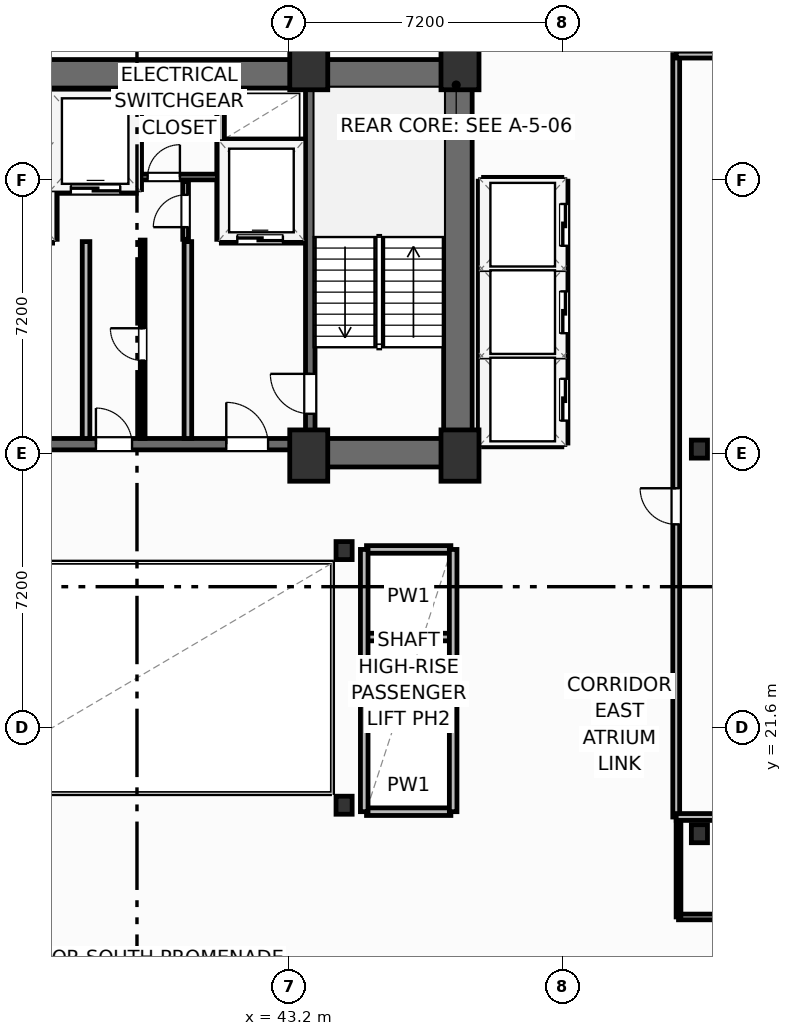
"""IFC4 building model, lengths in metres.
Left out: names, types, materials, properties, quantities, classifications, styles, units other than length and angle.
Written with IfcOpenShell. Run it as: python <this file> out.ifc"""

import sys

from ifc_helpers import new_model, si_unit, direction, frame, frame_2d, origin, origin_2d, place, context, subcontext, project, spatial, rectangle, i_section, extrude, element, fill, save


model = new_model("IFC4")
c1 = context("Model", 3, precision=1e-05, world=origin(), true_north=direction((0.0, 1.0)))
c2 = subcontext(c1, "Body", "Model", "MODEL_VIEW")
j1 = project(units=[si_unit("LENGTHUNIT", "METRE"), si_unit("PLANEANGLEUNIT", "RADIAN")], contexts=[c1])
p1 = place(None, origin())
s1 = spatial("IfcSite", under=j1, at=p1, CompositionType="ELEMENT")
p2 = place(p1, origin())
s2 = spatial("IfcBuilding", under=s1, at=p2, CompositionType="ELEMENT")
p3 = place(p2, frame((0.0, 0.0, 132.8)))
s3 = spatial("IfcBuildingStorey", under=s2, at=p3, CompositionType="ELEMENT", Elevation=132.8)
for number, where, z_axis, x_axis in (
    (1, (43.72, 28.75, 0.0), (0.0, 0.0, 1.0), (1.0, 0.0, 0.0)),
    (2, (47.7, 28.75, 0.0), (0.0, 0.0, 1.0), (1.0, 0.0, 0.0)),
    (3, (43.72, 39.05, 0.0), (0.0, 0.0, 1.0), (1.0, 0.0, 0.0)),
    (4, (47.7, 39.05, 0.0), (0.0, 0.0, 1.0), (1.0, 0.0, 0.0)),
):
    element("IfcColumn", number, at=place(p3, frame(where, z_axis=z_axis, x_axis=x_axis)), inside=s3, PredefinedType="COLUMN", context=c2, shape_type="SweptSolid", body=[
        extrude(rectangle(XDim=1.0, YDim=1.35, at=origin_2d()), origin(), (0.0, 0.0, 1.0), 3.7),
    ])
for number, where, z_axis, x_axis in (
    (5, (44.65, 19.55, 0.0), (0.0, 0.0, 1.0), (1.0, 0.0, 0.0)),
    (6, (44.65, 26.25, 0.0), (0.0, 0.0, 1.0), (1.0, 0.0, 0.0)),
    (7, (54.0, 18.8, 0.0), (0.0, 0.0, 1.0), (1.0, 0.0, 0.0)),
    (8, (54.0, 28.92, 0.0), (0.0, 0.0, 1.0), (1.0, 0.0, 0.0)),
):
    element("IfcColumn", number, at=place(p3, frame(where, z_axis=z_axis, x_axis=x_axis)), inside=s3, PredefinedType="COLUMN", context=c2, shape_type="SweptSolid", body=[
        extrude(i_section(OverallWidth=0.424, OverallDepth=0.474, WebThickness=0.048, FlangeThickness=0.077, FilletRadius=0.025, at=origin_2d()), origin(), (0.0, 0.0, 1.0), 3.7),
    ])
p4 = place(p3, frame((30.38, 38.795, 0.0), z_axis=(0.0, 0.0, 1.0), x_axis=(1.0, 0.0, 0.0)))
e9 = element("IfcWall", 9, at=p4, inside=s3, PredefinedType="SHEAR", context=c2, shape_type="SweptSolid", body=[
    extrude(rectangle(XDim=17.64, YDim=0.75, at=frame_2d((8.82, 0.0))), origin(), (0.0, 0.0, 1.0), 3.45),
])
p5 = place(p3, frame((47.645, 29.2, 0.0), z_axis=(0.0, 0.0, 1.0), x_axis=(0.0, 1.0, 0.0)))
e10 = element("IfcWall", 10, at=p5, inside=s3, PredefinedType="SHEAR", context=c2, shape_type="SweptSolid", body=[
    extrude(rectangle(XDim=9.22, YDim=0.75, at=frame_2d((4.61, 0.0))), origin(), (0.0, 0.0, 1.0), 3.45),
])
p6 = place(p3, frame((43.6, 28.825, 0.0), z_axis=(0.0, 0.0, 1.0), x_axis=(1.0, 0.0, 0.0)))
e11 = element("IfcWall", 11, at=p6, inside=s3, PredefinedType="SHEAR", context=c2, shape_type="SweptSolid", body=[
    extrude(rectangle(XDim=4.42, YDim=0.75, at=frame_2d((2.21, 0.0))), origin(), (0.0, 0.0, 1.0), 3.45),
])
p7 = place(p3, frame((34.8, 29.05, 0.0), z_axis=(0.0, 0.0, 1.0), x_axis=(1.0, 0.0, 0.0)))
e12 = element("IfcWall", 12, at=p7, inside=s3, PredefinedType="SHEAR", context=c2, shape_type="SweptSolid", body=[
    extrude(rectangle(XDim=8.8, YDim=0.3, at=frame_2d((4.4, 0.0))), origin(), (0.0, 0.0, 1.0), 3.45),
])
p8 = place(p7, frame((0.95, 0.0, 0.0)))
e13 = element("IfcOpeningElement", 13, at=p8, cuts=e12, PredefinedType="OPENING", context=c2, shape_type="SweptSolid", body=[
    extrude(rectangle(XDim=1.1, YDim=2.15, at=frame_2d((0.55, 1.075))), frame((0.0, 0.16, 0.0), z_axis=(0.0, -1.0, 0.0), x_axis=(1.0, 0.0, 0.0)), (0.0, 0.0, 1.0), 0.32),
])
p9 = place(p7, frame((6.75, 0.0, 0.0)))
e14 = element("IfcOpeningElement", 14, at=p9, cuts=e12, PredefinedType="OPENING", context=c2, shape_type="SweptSolid", body=[
    extrude(rectangle(XDim=1.1, YDim=2.15, at=frame_2d((0.55, 1.075))), frame((0.0, 0.16, 0.0), z_axis=(0.0, -1.0, 0.0), x_axis=(1.0, 0.0, 0.0)), (0.0, 0.0, 1.0), 0.32),
])
p10 = place(p7, frame((3.32, 0.0, 0.0)))
e15 = element("IfcOpeningElement", 15, at=p10, cuts=e12, PredefinedType="OPENING", context=c2, shape_type="SweptSolid", body=[
    extrude(rectangle(XDim=0.95, YDim=2.15, at=frame_2d((0.475, 1.075))), frame((0.0, 0.16, 0.0), z_axis=(0.0, -1.0, 0.0), x_axis=(1.0, 0.0, 0.0)), (0.0, 0.0, 1.0), 0.32),
])
p11 = place(p3, frame((43.76, 29.2, 0.0), z_axis=(0.0, 0.0, 1.0), x_axis=(0.0, 1.0, 0.0)))
e16 = element("IfcWall", 16, at=p11, inside=s3, PredefinedType="SHEAR", context=c2, shape_type="SweptSolid", body=[
    extrude(rectangle(XDim=9.22, YDim=0.25, at=frame_2d((4.61, 0.0))), origin(), (0.0, 0.0, 1.0), 3.45),
])
p12 = place(p11, frame((0.65, 0.0, 0.0)))
e17 = element("IfcOpeningElement", 17, at=p12, cuts=e16, PredefinedType="OPENING", context=c2, shape_type="SweptSolid", body=[
    extrude(rectangle(XDim=1.05, YDim=2.15, at=frame_2d((0.525, 1.075))), frame((0.0, 0.135, 0.0), z_axis=(0.0, -1.0, 0.0), x_axis=(1.0, 0.0, 0.0)), (0.0, 0.0, 1.0), 0.27),
])
p13 = place(p3, frame((53.45, 16.61, 0.0), z_axis=(0.0, 0.0, 1.0), x_axis=(1.0, 0.0, 0.0)))
e18 = element("IfcWall", 18, at=p13, inside=s3, PredefinedType="PARTITIONING", context=c2, shape_type="SweptSolid", body=[
    extrude(rectangle(XDim=16.55, YDim=0.15, at=frame_2d((8.275, 0.0))), origin(), (0.0, 0.0, 1.0), 3.45),
])
p14 = place(p13, frame((5.873, 0.0, 0.0)))
e19 = element("IfcOpeningElement", 19, at=p14, cuts=e18, PredefinedType="OPENING", context=c2, shape_type="SweptSolid", body=[
    extrude(rectangle(XDim=0.92, YDim=2.05, at=frame_2d((0.46, 1.025))), frame((0.0, 0.085, 0.0), z_axis=(0.0, -1.0, 0.0), x_axis=(1.0, 0.0, 0.0)), (0.0, 0.0, 1.0), 0.17),
])
p15 = place(p3, frame((53.45, 16.61, 0.0), z_axis=(0.0, 0.0, 1.0), x_axis=(0.0, 1.0, 0.0)))
e20 = element("IfcWall", 20, at=p15, inside=s3, PredefinedType="PARTITIONING", context=c2, shape_type="SweptSolid", body=[
    extrude(rectangle(XDim=2.63, YDim=0.125, at=frame_2d((1.315, 0.0))), origin(), (0.0, 0.0, 1.0), 3.45),
])
p16 = place(p3, frame((53.39, 19.24, 0.0), z_axis=(0.0, 0.0, 1.0), x_axis=(0.0, 1.0, 0.0)))
e21 = element("IfcWall", 21, at=p16, inside=s3, PredefinedType="PARTITIONING", context=c2, shape_type="SweptSolid", body=[
    extrude(rectangle(XDim=20.06, YDim=0.18, at=frame_2d((10.03, 0.0))), origin(), (0.0, 0.0, 1.0), 3.45),
])
p17 = place(p16, frame((7.7, 0.0, 0.0)))
e22 = element("IfcOpeningElement", 22, at=p17, cuts=e21, PredefinedType="OPENING", context=c2, shape_type="SweptSolid", body=[
    extrude(rectangle(XDim=0.95, YDim=2.05, at=frame_2d((0.475, 1.025))), frame((0.0, 0.1, 0.0), z_axis=(0.0, -1.0, 0.0), x_axis=(1.0, 0.0, 0.0)), (0.0, 0.0, 1.0), 0.2),
])
p18 = place(p3, frame((53.39, 19.24, 0.0), z_axis=(0.0, 0.0, 1.0), x_axis=(1.0, 0.0, 0.0)))
e23 = element("IfcWall", 23, at=p18, inside=s3, PredefinedType="PARTITIONING", context=c2, shape_type="SweptSolid", body=[
    extrude(rectangle(XDim=22.367, YDim=0.18, at=frame_2d((11.183, 0.0))), origin(), (0.0, 0.0, 1.0), 2.662),
])
p19 = place(p3, frame((53.39, 39.3, 0.0), z_axis=(0.0, 0.0, 1.0), x_axis=(1.0, 0.0, 0.0)))
e24 = element("IfcWall", 24, at=p19, inside=s3, PredefinedType="PARTITIONING", context=c2, shape_type="SweptSolid", body=[
    extrude(rectangle(XDim=24.74, YDim=0.18, at=frame_2d((12.37, 0.0))), origin(), (0.0, 0.0, 1.0), 3.45),
])
for number, where, z_axis, x_axis in (
    (25, (37.86, 29.2, 0.0), (0.0, 0.0, 1.0), (0.0, 1.0, 0.0)),
    (26, (40.54, 29.2, 0.0), (0.0, 0.0, 1.0), (0.0, 1.0, 0.0)),
):
    element("IfcWall", number, at=place(p3, frame(where, z_axis=z_axis, x_axis=x_axis)), inside=s3, PredefinedType="PARTITIONING", context=c2, shape_type="SweptSolid", body=[
        extrude(rectangle(XDim=5.18, YDim=0.2, at=frame_2d((2.59, 0.0))), origin(), (0.0, 0.0, 1.0), 3.45),
    ])
p20 = place(p3, frame((37.0, 34.44, 0.0), z_axis=(0.0, 0.0, 1.0), x_axis=(0.0, 1.0, 0.0)))
e27 = element("IfcWall", 27, at=p20, inside=s3, PredefinedType="PARTITIONING", context=c2, shape_type="SweptSolid", body=[
    extrude(rectangle(XDim=3.9, YDim=0.2, at=frame_2d((1.95, 0.0))), origin(), (0.0, 0.0, 1.0), 3.45),
])
p21 = place(p3, frame((41.42, 34.44, 0.0), z_axis=(0.0, 0.0, 1.0), x_axis=(1.0, 0.0, 0.0)))
e28 = element("IfcWall", 28, at=p21, inside=s3, PredefinedType="PARTITIONING", context=c2, shape_type="SweptSolid", body=[
    extrude(rectangle(XDim=2.18, YDim=0.2, at=frame_2d((1.09, 0.0))), origin(), (0.0, 0.0, 1.0), 3.45),
])
p22 = place(p21, frame((0.42, 0.0, 0.0)))
e29 = element("IfcOpeningElement", 29, at=p22, cuts=e28, PredefinedType="OPENING", context=c2, shape_type="SweptSolid", body=[
    extrude(rectangle(XDim=1.2, YDim=2.2, at=frame_2d((0.6, 1.1))), frame((0.0, 0.11, 0.0), z_axis=(0.0, -1.0, 0.0), x_axis=(1.0, 0.0, 0.0)), (0.0, 0.0, 1.0), 0.22),
])
p23 = place(p3, frame((41.42, 36.98, 0.0), z_axis=(0.0, 0.0, 1.0), x_axis=(1.0, 0.0, 0.0)))
e30 = element("IfcWall", 30, at=p23, inside=s3, PredefinedType="PARTITIONING", context=c2, shape_type="SweptSolid", body=[
    extrude(rectangle(XDim=2.18, YDim=0.2, at=frame_2d((1.09, 0.0))), origin(), (0.0, 0.0, 1.0), 3.45),
])
p24 = place(p3, frame((41.4, 34.44, 0.0), z_axis=(0.0, 0.0, 1.0), x_axis=(0.0, 1.0, 0.0)))
e31 = element("IfcWall", 31, at=p24, inside=s3, PredefinedType="PARTITIONING", context=c2, shape_type="SweptSolid", body=[
    extrude(rectangle(XDim=3.9, YDim=0.2, at=frame_2d((1.95, 0.0))), origin(), (0.0, 0.0, 1.0), 3.45),
])
p25 = place(p3, frame((37.06, 35.75, 0.0), z_axis=(0.0, 0.0, 1.0), x_axis=(1.0, 0.0, 0.0)))
e32 = element("IfcWall", 32, at=p25, inside=s3, PredefinedType="PARTITIONING", context=c2, shape_type="SweptSolid", body=[
    extrude(rectangle(XDim=2.12, YDim=0.2, at=frame_2d((1.06, 0.0))), origin(), (0.0, 0.0, 1.0), 3.45),
])
p26 = place(p25, frame((0.4, 0.0, 0.0)))
e33 = element("IfcOpeningElement", 33, at=p26, cuts=e32, PredefinedType="OPENING", context=c2, shape_type="SweptSolid", body=[
    extrude(rectangle(XDim=1.3, YDim=2.2, at=frame_2d((0.65, 1.1))), frame((0.0, 0.11, 0.0), z_axis=(0.0, -1.0, 0.0), x_axis=(1.0, 0.0, 0.0)), (0.0, 0.0, 1.0), 0.22),
])
p27 = place(p3, frame((39.22, 35.75, 0.0), z_axis=(0.0, 0.0, 1.0), x_axis=(0.0, 1.0, 0.0)))
e34 = element("IfcWall", 34, at=p27, inside=s3, PredefinedType="PARTITIONING", context=c2, shape_type="SweptSolid", body=[
    extrude(rectangle(XDim=2.59, YDim=0.2, at=frame_2d((1.295, 0.0))), origin(), (0.0, 0.0, 1.0), 3.45),
])
p28 = place(p3, frame((39.3, 36.08, 0.0), z_axis=(0.0, 0.0, 1.0), x_axis=(1.0, 0.0, 0.0)))
e35 = element("IfcWall", 35, at=p28, inside=s3, PredefinedType="PARTITIONING", context=c2, shape_type="SweptSolid", body=[
    extrude(rectangle(XDim=2.02, YDim=0.15, at=frame_2d((1.01, 0.0))), origin(), (0.0, 0.0, 1.0), 3.45),
])
p29 = place(p28, frame((0.18, 0.0, 0.0)))
e36 = element("IfcOpeningElement", 36, at=p29, cuts=e35, PredefinedType="OPENING", context=c2, shape_type="SweptSolid", body=[
    extrude(rectangle(XDim=0.85, YDim=2.05, at=frame_2d((0.425, 1.025))), frame((0.0, 0.085, 0.0), z_axis=(0.0, -1.0, 0.0), x_axis=(1.0, 0.0, 0.0)), (0.0, 0.0, 1.0), 0.17),
])
p30 = place(p3, frame((40.48, 34.44, 0.0), z_axis=(0.0, 0.0, 1.0), x_axis=(0.0, 1.0, 0.0)))
e37 = element("IfcWall", 37, at=p30, inside=s3, PredefinedType="PARTITIONING", context=c2, shape_type="SweptSolid", body=[
    extrude(rectangle(XDim=1.52, YDim=0.15, at=frame_2d((0.76, 0.0))), origin(), (0.0, 0.0, 1.0), 3.45),
])
p31 = place(p30, frame((0.32, 0.0, 0.0)))
e38 = element("IfcOpeningElement", 38, at=p31, cuts=e37, PredefinedType="OPENING", context=c2, shape_type="SweptSolid", body=[
    extrude(rectangle(XDim=0.85, YDim=2.05, at=frame_2d((0.425, 1.025))), frame((0.0, 0.085, 0.0), z_axis=(0.0, -1.0, 0.0), x_axis=(1.0, 0.0, 0.0)), (0.0, 0.0, 1.0), 0.17),
])
p32 = place(p3, frame((39.35, 29.2, 0.0), z_axis=(0.0, 0.0, 1.0), x_axis=(0.0, 1.0, 0.0)))
e39 = element("IfcWall", 39, at=p32, inside=s3, PredefinedType="PARTITIONING", context=c2, shape_type="SweptSolid", body=[
    extrude(rectangle(XDim=5.22, YDim=0.125, at=frame_2d((2.61, 0.0))), origin(), (0.0, 0.0, 1.0), 3.45),
])
p33 = place(p32, frame((2.05, 0.0, 0.0)))
e40 = element("IfcOpeningElement", 40, at=p33, cuts=e39, PredefinedType="OPENING", context=c2, shape_type="SweptSolid", body=[
    extrude(rectangle(XDim=0.85, YDim=2.05, at=frame_2d((0.425, 1.025))), frame((0.0, 0.073, 0.0), z_axis=(0.0, -1.0, 0.0), x_axis=(1.0, 0.0, 0.0)), (0.0, 0.0, 1.0), 0.145),
])
for number, where, z_axis, x_axis in (
    (41, (48.32, 31.375, 0.0), (0.0, 0.0, 1.0), (1.0, 0.0, 0.0)),
    (42, (48.32, 33.675, 0.0), (0.0, 0.0, 1.0), (1.0, 0.0, 0.0)),
):
    element("IfcWall", number, at=place(p3, frame(where, z_axis=z_axis, x_axis=x_axis)), inside=s3, PredefinedType="PARTITIONING", context=c2, shape_type="SweptSolid", body=[
        extrude(rectangle(XDim=2.06, YDim=0.2, at=frame_2d((1.03, 0.0))), origin(), (0.0, 0.0, 1.0), 3.45),
    ])
p34 = place(p3, frame((48.32, 29.08, 0.0), z_axis=(0.0, 0.0, 1.0), x_axis=(1.0, 0.0, 0.0)))
e43 = element("IfcWall", 43, at=p34, inside=s3, PredefinedType="PARTITIONING", context=c2, shape_type="SweptSolid", body=[
    extrude(rectangle(XDim=2.06, YDim=0.2, at=frame_2d((1.03, 0.0))), origin(), (0.0, 0.0, 1.0), 2.662),
])
p35 = place(p3, frame((48.32, 35.97, 0.0), z_axis=(0.0, 0.0, 1.0), x_axis=(1.0, 0.0, 0.0)))
e44 = element("IfcWall", 44, at=p35, inside=s3, PredefinedType="PARTITIONING", context=c2, shape_type="SweptSolid", body=[
    extrude(rectangle(XDim=2.06, YDim=0.2, at=frame_2d((1.03, 0.0))), origin(), (0.0, 0.0, 1.0), 3.45),
])
p36 = place(p3, frame((48.28, 29.08, 0.0), z_axis=(0.0, 0.0, 1.0), x_axis=(0.0, 1.0, 0.0)))
e45 = element("IfcWall", 45, at=p36, inside=s3, PredefinedType="PARTITIONING", context=c2, shape_type="SweptSolid", body=[
    extrude(rectangle(XDim=6.89, YDim=0.2, at=frame_2d((3.445, 0.0))), origin(), (0.0, 0.0, 1.0), 3.45),
])
p37 = place(p3, frame((50.44, 29.08, 0.0), z_axis=(0.0, 0.0, 1.0), x_axis=(0.0, 1.0, 0.0)))
e46 = element("IfcWall", 46, at=p37, inside=s3, PredefinedType="PARTITIONING", context=c2, shape_type="SweptSolid", body=[
    extrude(rectangle(XDim=6.89, YDim=0.2, at=frame_2d((3.445, 0.0))), origin(), (0.0, 0.0, 1.0), 3.45),
])
p38 = place(p37, frame((0.59, 0.0, 0.0)))
e47 = element("IfcOpeningElement", 47, at=p38, cuts=e46, PredefinedType="OPENING", context=c2, shape_type="SweptSolid", body=[
    extrude(rectangle(XDim=1.1, YDim=2.15, at=frame_2d((0.55, 1.075))), frame((0.0, 0.11, 0.0), z_axis=(0.0, -1.0, 0.0), x_axis=(1.0, 0.0, 0.0)), (0.0, 0.0, 1.0), 0.22),
])
p39 = place(p37, frame((2.89, 0.0, 0.0)))
e48 = element("IfcOpeningElement", 48, at=p39, cuts=e46, PredefinedType="OPENING", context=c2, shape_type="SweptSolid", body=[
    extrude(rectangle(XDim=1.1, YDim=2.15, at=frame_2d((0.55, 1.075))), frame((0.0, 0.11, 0.0), z_axis=(0.0, -1.0, 0.0), x_axis=(1.0, 0.0, 0.0)), (0.0, 0.0, 1.0), 0.22),
])
p40 = place(p37, frame((5.19, 0.0, 0.0)))
e49 = element("IfcOpeningElement", 49, at=p40, cuts=e46, PredefinedType="OPENING", context=c2, shape_type="SweptSolid", body=[
    extrude(rectangle(XDim=1.1, YDim=2.15, at=frame_2d((0.55, 1.075))), frame((0.0, 0.11, 0.0), z_axis=(0.0, -1.0, 0.0), x_axis=(1.0, 0.0, 0.0)), (0.0, 0.0, 1.0), 0.22),
])
for number, where, z_axis, x_axis in (
    (50, (45.24, 21.675, 0.0), (0.0, 0.0, 1.0), (1.0, 0.0, 0.0)),
    (51, (45.24, 23.975, 0.0), (0.0, 0.0, 1.0), (1.0, 0.0, 0.0)),
):
    element("IfcWall", number, at=place(p3, frame(where, z_axis=z_axis, x_axis=x_axis)), inside=s3, PredefinedType="PARTITIONING", context=c2, shape_type="SweptSolid", body=[
        extrude(rectangle(XDim=2.22, YDim=0.2, at=frame_2d((1.11, 0.0))), origin(), (0.0, 0.0, 1.0), 3.45),
    ])
p41 = place(p3, frame((45.24, 19.38, 0.0), z_axis=(0.0, 0.0, 1.0), x_axis=(1.0, 0.0, 0.0)))
e52 = element("IfcWall", 52, at=p41, inside=s3, PredefinedType="PARTITIONING", context=c2, shape_type="SweptSolid", body=[
    extrude(rectangle(XDim=2.22, YDim=0.2, at=frame_2d((1.11, 0.0))), origin(), (0.0, 0.0, 1.0), 2.662),
])
p42 = place(p3, frame((45.24, 26.28, 0.0), z_axis=(0.0, 0.0, 1.0), x_axis=(1.0, 0.0, 0.0)))
e53 = element("IfcWall", 53, at=p42, inside=s3, PredefinedType="PARTITIONING", context=c2, shape_type="SweptSolid", body=[
    extrude(rectangle(XDim=2.22, YDim=0.2, at=frame_2d((1.11, 0.0))), origin(), (0.0, 0.0, 1.0), 3.45),
])
for number, where, z_axis, x_axis in (
    (54, (45.18, 19.38, 0.0), (0.0, 0.0, 1.0), (0.0, 1.0, 0.0)),
    (55, (47.52, 19.38, 0.0), (0.0, 0.0, 1.0), (0.0, 1.0, 0.0)),
):
    element("IfcWall", number, at=place(p3, frame(where, z_axis=z_axis, x_axis=x_axis)), inside=s3, PredefinedType="PARTITIONING", context=c2, shape_type="SweptSolid", body=[
        extrude(rectangle(XDim=6.9, YDim=0.2, at=frame_2d((3.45, 0.0))), origin(), (0.0, 0.0, 1.0), 3.45),
    ])
p43 = place(p17, origin())
e56 = element("IfcDoor", 56, at=p43, inside=s3, OperationType="SINGLE_SWING_RIGHT", PredefinedType="DOOR", context=c2, shape_type="SweptSolid", body=[
    extrude(rectangle(XDim=0.95, YDim=2.05, at=frame_2d((0.475, 1.025))), frame((0.0, 0.025, 0.0), z_axis=(0.0, -1.0, 0.0), x_axis=(1.0, 0.0, 0.0)), (0.0, 0.0, 1.0), 0.05),
])
fill(e22, e56)
p44 = place(p12, origin())
e57 = element("IfcDoor", 57, at=p44, inside=s3, OperationType="SINGLE_SWING_RIGHT", PredefinedType="DOOR", context=c2, shape_type="SweptSolid", body=[
    extrude(rectangle(XDim=1.05, YDim=2.15, at=frame_2d((0.525, 1.075))), frame((0.0, 0.025, 0.0), z_axis=(0.0, -1.0, 0.0), x_axis=(1.0, 0.0, 0.0)), (0.0, 0.0, 1.0), 0.05),
])
fill(e17, e57)
p45 = place(p9, origin())
e58 = element("IfcDoor", 58, at=p45, inside=s3, OperationType="SINGLE_SWING_LEFT", PredefinedType="DOOR", context=c2, shape_type="SweptSolid", body=[
    extrude(rectangle(XDim=1.1, YDim=2.15, at=frame_2d((0.55, 1.075))), frame((0.0, 0.025, 0.0), z_axis=(0.0, -1.0, 0.0), x_axis=(1.0, 0.0, 0.0)), (0.0, 0.0, 1.0), 0.05),
])
fill(e14, e58)
p46 = place(p22, origin())
e59 = element("IfcDoor", 59, at=p46, inside=s3, OperationType="SLIDING_TO_LEFT", PredefinedType="DOOR", context=c2, shape_type="SweptSolid", body=[
    extrude(rectangle(XDim=1.2, YDim=2.2, at=frame_2d((0.6, 1.1))), frame((0.0, 0.025, 0.0), z_axis=(0.0, -1.0, 0.0), x_axis=(1.0, 0.0, 0.0)), (0.0, 0.0, 1.0), 0.05),
])
fill(e29, e59)
p47 = place(p26, origin())
e60 = element("IfcDoor", 60, at=p47, inside=s3, OperationType="SLIDING_TO_LEFT", PredefinedType="DOOR", context=c2, shape_type="SweptSolid", body=[
    extrude(rectangle(XDim=1.3, YDim=2.2, at=frame_2d((0.65, 1.1))), frame((0.0, 0.025, 0.0), z_axis=(0.0, -1.0, 0.0), x_axis=(1.0, 0.0, 0.0)), (0.0, 0.0, 1.0), 0.05),
])
fill(e33, e60)
p48 = place(p29, origin())
e61 = element("IfcDoor", 61, at=p48, inside=s3, OperationType="SINGLE_SWING_RIGHT", PredefinedType="DOOR", context=c2, shape_type="SweptSolid", body=[
    extrude(rectangle(XDim=0.85, YDim=2.05, at=frame_2d((0.425, 1.025))), frame((0.0, 0.025, 0.0), z_axis=(0.0, -1.0, 0.0), x_axis=(1.0, 0.0, 0.0)), (0.0, 0.0, 1.0), 0.05),
])
fill(e36, e61)
p49 = place(p31, origin())
e62 = element("IfcDoor", 62, at=p49, inside=s3, OperationType="SINGLE_SWING_LEFT", PredefinedType="DOOR", context=c2, shape_type="SweptSolid", body=[
    extrude(rectangle(XDim=0.85, YDim=2.05, at=frame_2d((0.425, 1.025))), frame((0.0, 0.025, 0.0), z_axis=(0.0, -1.0, 0.0), x_axis=(1.0, 0.0, 0.0)), (0.0, 0.0, 1.0), 0.05),
])
fill(e38, e62)
p50 = place(p33, origin())
e63 = element("IfcDoor", 63, at=p50, inside=s3, OperationType="SINGLE_SWING_RIGHT", PredefinedType="DOOR", context=c2, shape_type="SweptSolid", body=[
    extrude(rectangle(XDim=0.85, YDim=2.05, at=frame_2d((0.425, 1.025))), frame((0.0, 0.025, 0.0), z_axis=(0.0, -1.0, 0.0), x_axis=(1.0, 0.0, 0.0)), (0.0, 0.0, 1.0), 0.05),
])
fill(e40, e63)
p51 = place(p10, origin())
e64 = element("IfcDoor", 64, at=p51, inside=s3, OperationType="SINGLE_SWING_LEFT", PredefinedType="DOOR", context=c2, shape_type="SweptSolid", body=[
    extrude(rectangle(XDim=0.95, YDim=2.15, at=frame_2d((0.475, 1.075))), frame((0.0, 0.025, 0.0), z_axis=(0.0, -1.0, 0.0), x_axis=(1.0, 0.0, 0.0)), (0.0, 0.0, 1.0), 0.05),
])
fill(e15, e64)
p52 = place(p38, origin())
e65 = element("IfcDoor", 65, at=p52, inside=s3, OperationType="SLIDING_TO_LEFT", PredefinedType="DOOR", context=c2, shape_type="SweptSolid", body=[
    extrude(rectangle(XDim=1.1, YDim=2.15, at=frame_2d((0.55, 1.075))), frame((0.0, 0.025, 0.0), z_axis=(0.0, -1.0, 0.0), x_axis=(1.0, 0.0, 0.0)), (0.0, 0.0, 1.0), 0.05),
])
fill(e47, e65)
p53 = place(p39, origin())
e66 = element("IfcDoor", 66, at=p53, inside=s3, OperationType="SLIDING_TO_LEFT", PredefinedType="DOOR", context=c2, shape_type="SweptSolid", body=[
    extrude(rectangle(XDim=1.1, YDim=2.15, at=frame_2d((0.55, 1.075))), frame((0.0, 0.025, 0.0), z_axis=(0.0, -1.0, 0.0), x_axis=(1.0, 0.0, 0.0)), (0.0, 0.0, 1.0), 0.05),
])
fill(e48, e66)
p54 = place(p40, origin())
e67 = element("IfcDoor", 67, at=p54, inside=s3, OperationType="SLIDING_TO_LEFT", PredefinedType="DOOR", context=c2, shape_type="SweptSolid", body=[
    extrude(rectangle(XDim=1.1, YDim=2.15, at=frame_2d((0.55, 1.075))), frame((0.0, 0.025, 0.0), z_axis=(0.0, -1.0, 0.0), x_axis=(1.0, 0.0, 0.0)), (0.0, 0.0, 1.0), 0.05),
])
fill(e49, e67)
save(model, sys.argv[1])
